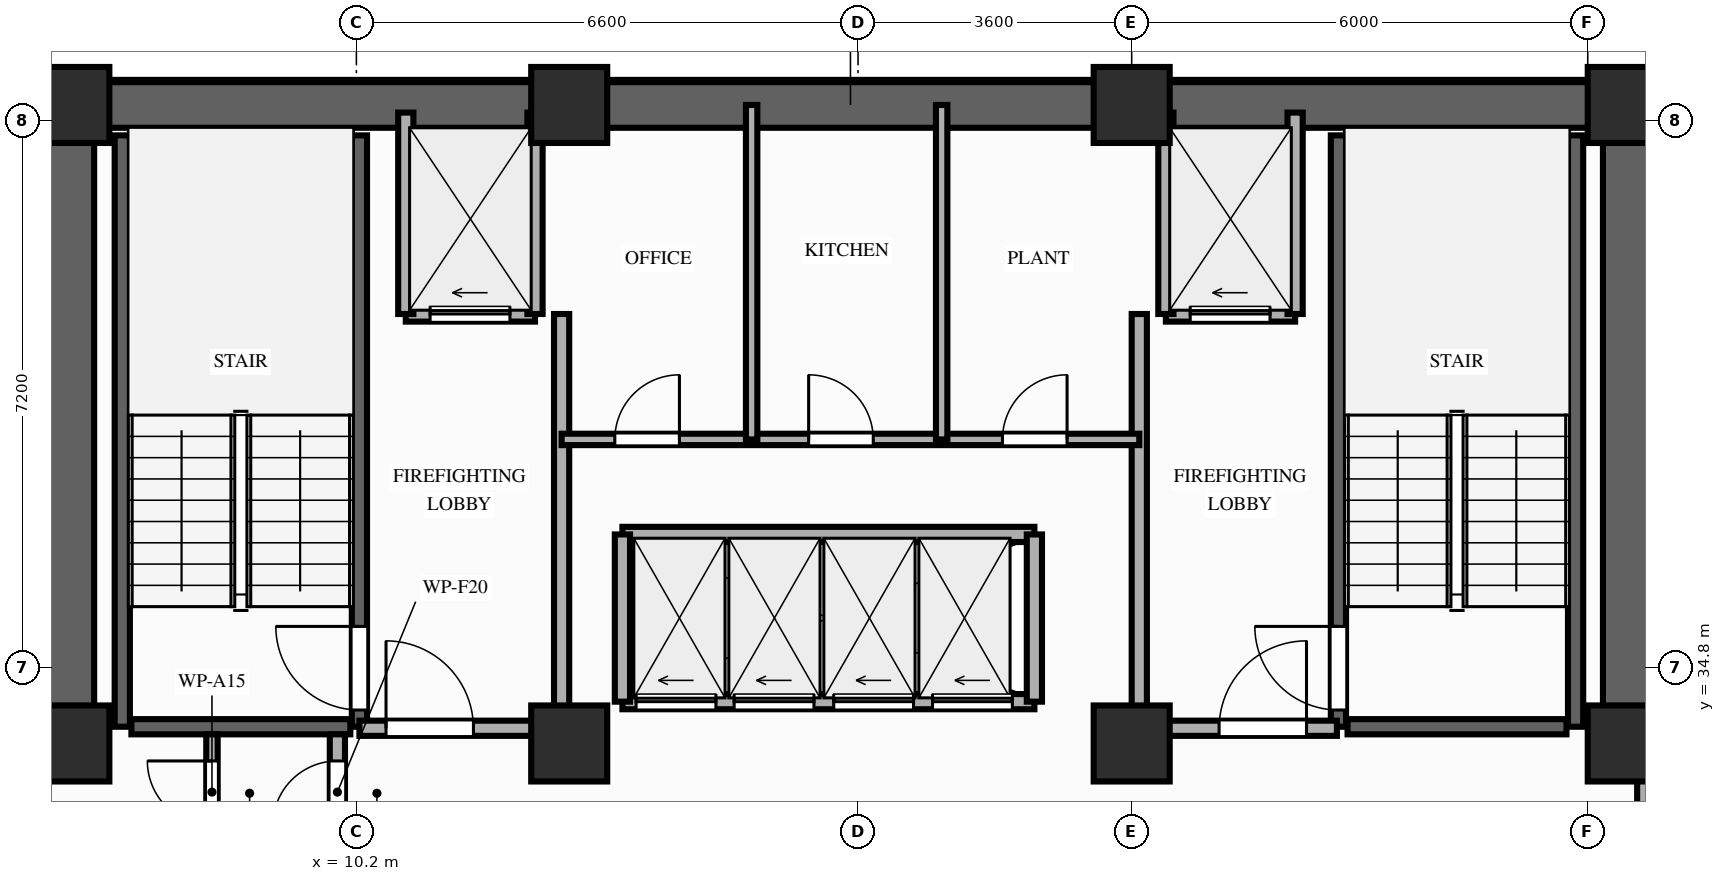
"""IFC4 building model, lengths in metres.
Left out: names, types, materials, properties, quantities, classifications, styles, units other than length and angle.
Written with IfcOpenShell. Run it as: python <this file> out.ifc"""

import sys

from ifc_helpers import new_model, si_unit, direction, frame, frame_2d, origin, origin_2d, place, context, subcontext, project, spatial, rectangle, extrude, element, fill, save


model = new_model("IFC4")
c1 = context("Model", 3, precision=1e-05, world=origin(), true_north=direction((0.0, 1.0)))
c2 = subcontext(c1, "Body", "Model", "MODEL_VIEW")
j1 = project(units=[si_unit("LENGTHUNIT", "METRE"), si_unit("PLANEANGLEUNIT", "RADIAN")], contexts=[c1])
p1 = place(None, origin())
s1 = spatial("IfcSite", under=j1, at=p1, CompositionType="ELEMENT")
p2 = place(p1, origin())
s2 = spatial("IfcBuilding", under=s1, at=p2, CompositionType="ELEMENT")
p3 = place(p2, frame((0.0, 0.0, 113.8)))
s3 = spatial("IfcBuildingStorey", under=s2, at=p3, CompositionType="ELEMENT", Elevation=113.8)
for number, where, z_axis, x_axis in (
    (1, (6.45, 33.8, 0.0), (0.0, 0.0, 1.0), (1.0, 0.0, 0.0)),
    (2, (13.0, 33.8, 0.0), (0.0, 0.0, 1.0), (1.0, 0.0, 0.0)),
    (3, (20.4, 33.8, 0.0), (0.0, 0.0, 1.0), (1.0, 0.0, 0.0)),
    (4, (26.9, 33.8, 0.0), (0.0, 0.0, 1.0), (1.0, 0.0, 0.0)),
    (5, (6.45, 42.2, 0.0), (0.0, 0.0, 1.0), (1.0, 0.0, 0.0)),
    (6, (13.0, 42.2, 0.0), (0.0, 0.0, 1.0), (1.0, 0.0, 0.0)),
    (7, (20.4, 42.2, 0.0), (0.0, 0.0, 1.0), (1.0, 0.0, 0.0)),
    (8, (26.9, 42.2, 0.0), (0.0, 0.0, 1.0), (1.0, 0.0, 0.0)),
):
    element("IfcColumn", number, at=place(p3, frame(where, z_axis=z_axis, x_axis=x_axis)), inside=s3, PredefinedType="COLUMN", context=c2, shape_type="SweptSolid", body=[
        extrude(rectangle(XDim=1.0, YDim=1.0, at=origin_2d()), origin(), (0.0, 0.0, 1.0), 3.2),
    ])
p4 = place(p3, frame((6.45, 42.2, 0.0), z_axis=(0.0, 0.0, 1.0), x_axis=(1.0, 0.0, 0.0)))
e9 = element("IfcWall", 9, at=p4, inside=s3, PredefinedType="SHEAR", context=c2, shape_type="SweptSolid", body=[
    extrude(rectangle(XDim=20.45, YDim=0.6, at=frame_2d((10.225, 0.0))), origin(), (0.0, 0.0, 1.0), 3.02),
])
for number, where, z_axis, x_axis in (
    (10, (6.45, 33.8, 0.0), (0.0, 0.0, 1.0), (0.0, 1.0, 0.0)),
    (11, (26.9, 33.8, 0.0), (0.0, 0.0, 1.0), (0.0, 1.0, 0.0)),
):
    element("IfcWall", number, at=place(p3, frame(where, z_axis=z_axis, x_axis=x_axis)), inside=s3, PredefinedType="SHEAR", context=c2, shape_type="SweptSolid", body=[
        extrude(rectangle(XDim=7.95, YDim=0.6, at=frame_2d((3.975, 0.0))), origin(), (0.0, 0.0, 1.0), 3.02),
    ])
p5 = place(p3, frame((7.12, 34.02, 0.0), z_axis=(0.0, 0.0, 1.0), x_axis=(0.0, 1.0, 0.0)))
e12 = element("IfcWall", 12, at=p5, inside=s3, PredefinedType="SHEAR", context=c2, shape_type="SweptSolid", body=[
    extrude(rectangle(XDim=7.78, YDim=0.2, at=frame_2d((3.89, 0.0))), origin(), (0.0, 0.0, 1.0), 3.02),
])
p6 = place(p3, frame((10.24, 34.02, 0.0), z_axis=(0.0, 0.0, 1.0), x_axis=(0.0, 1.0, 0.0)))
e13 = element("IfcWall", 13, at=p6, inside=s3, PredefinedType="SHEAR", context=c2, shape_type="SweptSolid", body=[
    extrude(rectangle(XDim=7.78, YDim=0.2, at=frame_2d((3.89, 0.0))), origin(), (0.0, 0.0, 1.0), 3.02),
])
p7 = place(p6, frame((0.22, 0.0, 0.0)))
e14 = element("IfcOpeningElement", 14, at=p7, cuts=e13, PredefinedType="OPENING", context=c2, shape_type="SweptSolid", body=[
    extrude(rectangle(XDim=1.1, YDim=2.15, at=frame_2d((0.55, 1.075))), frame((0.0, 0.11, 0.0), z_axis=(0.0, -1.0, 0.0), x_axis=(1.0, 0.0, 0.0)), (0.0, 0.0, 1.0), 0.22),
])
p8 = place(p3, frame((7.24, 34.02, 0.0), z_axis=(0.0, 0.0, 1.0), x_axis=(1.0, 0.0, 0.0)))
e15 = element("IfcWall", 15, at=p8, inside=s3, PredefinedType="SHEAR", context=c2, shape_type="SweptSolid", body=[
    extrude(rectangle(XDim=2.88, YDim=0.2, at=frame_2d((1.44, 0.0))), origin(), (0.0, 0.0, 1.0), 3.02),
])
p9 = place(p3, frame((23.12, 34.02, 0.0), z_axis=(0.0, 0.0, 1.0), x_axis=(0.0, 1.0, 0.0)))
e16 = element("IfcWall", 16, at=p9, inside=s3, PredefinedType="SHEAR", context=c2, shape_type="SweptSolid", body=[
    extrude(rectangle(XDim=7.78, YDim=0.2, at=frame_2d((3.89, 0.0))), origin(), (0.0, 0.0, 1.0), 3.02),
])
p10 = place(p9, frame((0.22, 0.0, 0.0)))
e17 = element("IfcOpeningElement", 17, at=p10, cuts=e16, PredefinedType="OPENING", context=c2, shape_type="SweptSolid", body=[
    extrude(rectangle(XDim=1.1, YDim=2.15, at=frame_2d((0.55, 1.075))), frame((0.0, 0.11, 0.0), z_axis=(0.0, -1.0, 0.0), x_axis=(1.0, 0.0, 0.0)), (0.0, 0.0, 1.0), 0.22),
])
p11 = place(p3, frame((26.24, 34.02, 0.0), z_axis=(0.0, 0.0, 1.0), x_axis=(0.0, 1.0, 0.0)))
e18 = element("IfcWall", 18, at=p11, inside=s3, PredefinedType="SHEAR", context=c2, shape_type="SweptSolid", body=[
    extrude(rectangle(XDim=7.78, YDim=0.2, at=frame_2d((3.89, 0.0))), origin(), (0.0, 0.0, 1.0), 3.02),
])
p12 = place(p3, frame((23.24, 34.02, 0.0), z_axis=(0.0, 0.0, 1.0), x_axis=(1.0, 0.0, 0.0)))
e19 = element("IfcWall", 19, at=p12, inside=s3, PredefinedType="SHEAR", context=c2, shape_type="SweptSolid", body=[
    extrude(rectangle(XDim=2.88, YDim=0.2, at=frame_2d((1.44, 0.0))), origin(), (0.0, 0.0, 1.0), 3.02),
])
p13 = place(p3, frame((10.85, 39.45, 0.0), z_axis=(0.0, 0.0, 1.0), x_axis=(1.0, 0.0, 0.0)))
e20 = element("IfcWall", 20, at=p13, inside=s3, PredefinedType="MOVABLE", context=c2, shape_type="SweptSolid", body=[
    extrude(rectangle(XDim=1.7, YDim=0.2, at=frame_2d((0.85, 0.0))), origin(), (0.0, 0.0, 1.0), 3.02),
])
p14 = place(p13, frame((0.32, 0.0, 0.0)))
e21 = element("IfcOpeningElement", 21, at=p14, cuts=e20, PredefinedType="OPENING", context=c2, shape_type="SweptSolid", body=[
    extrude(rectangle(XDim=1.05, YDim=2.15, at=frame_2d((0.525, 1.075))), frame((0.0, 0.11, 0.0), z_axis=(0.0, -1.0, 0.0), x_axis=(1.0, 0.0, 0.0)), (0.0, 0.0, 1.0), 0.22),
])
p15 = place(p3, frame((20.85, 39.45, 0.0), z_axis=(0.0, 0.0, 1.0), x_axis=(1.0, 0.0, 0.0)))
e22 = element("IfcWall", 22, at=p15, inside=s3, PredefinedType="MOVABLE", context=c2, shape_type="SweptSolid", body=[
    extrude(rectangle(XDim=1.7, YDim=0.2, at=frame_2d((0.85, 0.0))), origin(), (0.0, 0.0, 1.0), 3.02),
])
p16 = place(p15, frame((0.32, 0.0, 0.0)))
e23 = element("IfcOpeningElement", 23, at=p16, cuts=e22, PredefinedType="OPENING", context=c2, shape_type="SweptSolid", body=[
    extrude(rectangle(XDim=1.05, YDim=2.15, at=frame_2d((0.525, 1.075))), frame((0.0, 0.11, 0.0), z_axis=(0.0, -1.0, 0.0), x_axis=(1.0, 0.0, 0.0)), (0.0, 0.0, 1.0), 0.22),
])
for number, where, z_axis, x_axis in (
    (24, (10.85, 39.45, 0.0), (0.0, 0.0, 1.0), (0.0, 1.0, 0.0)),
    (25, (12.55, 39.45, 0.0), (0.0, 0.0, 1.0), (0.0, 1.0, 0.0)),
):
    element("IfcWall", number, at=place(p3, frame(where, z_axis=z_axis, x_axis=x_axis)), inside=s3, PredefinedType="MOVABLE", context=c2, shape_type="SweptSolid", body=[
        extrude(rectangle(XDim=2.65, YDim=0.2, at=frame_2d((1.325, 0.0))), origin(), (0.0, 0.0, 1.0), 2.4),
    ])
p17 = place(p3, frame((12.9, 34.0, 0.0), z_axis=(0.0, 0.0, 1.0), x_axis=(0.0, 1.0, 0.0)))
e26 = element("IfcWall", 26, at=p17, inside=s3, PredefinedType="PARTITIONING", context=c2, shape_type="SweptSolid", body=[
    extrude(rectangle(XDim=5.45, YDim=0.2, at=frame_2d((2.725, 0.0))), origin(), (0.0, 0.0, 1.0), 2.4),
])
p18 = place(p3, frame((10.24, 34.0, 0.0), z_axis=(0.0, 0.0, 1.0), x_axis=(1.0, 0.0, 0.0)))
e27 = element("IfcWall", 27, at=p18, inside=s3, PredefinedType="PARTITIONING", context=c2, shape_type="SweptSolid", body=[
    extrude(rectangle(XDim=2.66, YDim=0.2, at=frame_2d((1.33, 0.0))), origin(), (0.0, 0.0, 1.0), 2.4),
])
p19 = place(p18, frame((0.35, 0.0, 0.0)))
e28 = element("IfcOpeningElement", 28, at=p19, cuts=e27, PredefinedType="OPENING", context=c2, shape_type="SweptSolid", body=[
    extrude(rectangle(XDim=1.15, YDim=2.15, at=frame_2d((0.575, 1.075))), frame((0.0, 0.11, 0.0), z_axis=(0.0, -1.0, 0.0), x_axis=(1.0, 0.0, 0.0)), (0.0, 0.0, 1.0), 0.22),
])
for number, where, z_axis, x_axis in (
    (29, (20.85, 39.45, 0.0), (0.0, 0.0, 1.0), (0.0, 1.0, 0.0)),
    (30, (22.55, 39.45, 0.0), (0.0, 0.0, 1.0), (0.0, 1.0, 0.0)),
):
    element("IfcWall", number, at=place(p3, frame(where, z_axis=z_axis, x_axis=x_axis)), inside=s3, PredefinedType="MOVABLE", context=c2, shape_type="SweptSolid", body=[
        extrude(rectangle(XDim=2.65, YDim=0.2, at=frame_2d((1.325, 0.0))), origin(), (0.0, 0.0, 1.0), 2.4),
    ])
p20 = place(p3, frame((20.5, 34.0, 0.0), z_axis=(0.0, 0.0, 1.0), x_axis=(0.0, 1.0, 0.0)))
e31 = element("IfcWall", 31, at=p20, inside=s3, PredefinedType="PARTITIONING", context=c2, shape_type="SweptSolid", body=[
    extrude(rectangle(XDim=5.45, YDim=0.2, at=frame_2d((2.725, 0.0))), origin(), (0.0, 0.0, 1.0), 2.4),
])
p21 = place(p3, frame((20.5, 34.0, 0.0), z_axis=(0.0, 0.0, 1.0), x_axis=(1.0, 0.0, 0.0)))
e32 = element("IfcWall", 32, at=p21, inside=s3, PredefinedType="PARTITIONING", context=c2, shape_type="SweptSolid", body=[
    extrude(rectangle(XDim=2.6, YDim=0.2, at=frame_2d((1.3, 0.0))), origin(), (0.0, 0.0, 1.0), 2.4),
])
p22 = place(p21, frame((1.05, 0.0, 0.0)))
e33 = element("IfcOpeningElement", 33, at=p22, cuts=e32, PredefinedType="OPENING", context=c2, shape_type="SweptSolid", body=[
    extrude(rectangle(XDim=1.15, YDim=2.15, at=frame_2d((0.575, 1.075))), frame((0.0, 0.11, 0.0), z_axis=(0.0, -1.0, 0.0), x_axis=(1.0, 0.0, 0.0)), (0.0, 0.0, 1.0), 0.22),
])
p23 = place(p3, frame((9.95, 32.4, 0.0), z_axis=(0.0, 0.0, 1.0), x_axis=(0.0, 1.0, 0.0)))
e34 = element("IfcWall", 34, at=p23, inside=s3, PredefinedType="PARTITIONING", context=c2, shape_type="SweptSolid", body=[
    extrude(rectangle(XDim=1.52, YDim=0.2, at=frame_2d((0.76, 0.0))), origin(), (0.0, 0.0, 1.0), 2.4),
])
p24 = place(p23, frame((0.32, 0.0, 0.0)))
e35 = element("IfcOpeningElement", 35, at=p24, cuts=e34, PredefinedType="OPENING", context=c2, shape_type="SweptSolid", body=[
    extrude(rectangle(XDim=0.85, YDim=2.05, at=frame_2d((0.425, 1.025))), frame((0.0, 0.11, 0.0), z_axis=(0.0, -1.0, 0.0), x_axis=(1.0, 0.0, 0.0)), (0.0, 0.0, 1.0), 0.22),
])
p25 = place(p3, frame((8.3, 32.4, 0.0), z_axis=(0.0, 0.0, 1.0), x_axis=(0.0, 1.0, 0.0)))
e36 = element("IfcWall", 36, at=p25, inside=s3, PredefinedType="PARTITIONING", context=c2, shape_type="SweptSolid", body=[
    extrude(rectangle(XDim=1.52, YDim=0.15, at=frame_2d((0.76, 0.0))), origin(), (0.0, 0.0, 1.0), 2.4),
])
p26 = place(p25, frame((0.32, 0.0, 0.0)))
e37 = element("IfcOpeningElement", 37, at=p26, cuts=e36, PredefinedType="OPENING", context=c2, shape_type="SweptSolid", body=[
    extrude(rectangle(XDim=0.85, YDim=2.05, at=frame_2d((0.425, 1.025))), frame((0.0, 0.085, 0.0), z_axis=(0.0, -1.0, 0.0), x_axis=(1.0, 0.0, 0.0)), (0.0, 0.0, 1.0), 0.17),
])
p27 = place(p3, frame((12.9, 37.8, 0.0), z_axis=(0.0, 0.0, 1.0), x_axis=(1.0, 0.0, 0.0)))
e38 = element("IfcWall", 38, at=p27, inside=s3, PredefinedType="PARTITIONING", context=c2, shape_type="SweptSolid", body=[
    extrude(rectangle(XDim=7.6, YDim=0.15, at=frame_2d((3.8, 0.0))), origin(), (0.0, 0.0, 1.0), 3.02),
])
p28 = place(p27, frame((0.7, 0.0, 0.0)))
e39 = element("IfcOpeningElement", 39, at=p28, cuts=e38, PredefinedType="OPENING", context=c2, shape_type="SweptSolid", body=[
    extrude(rectangle(XDim=0.85, YDim=2.05, at=frame_2d((0.425, 1.025))), frame((0.0, 0.085, 0.0), z_axis=(0.0, -1.0, 0.0), x_axis=(1.0, 0.0, 0.0)), (0.0, 0.0, 1.0), 0.17),
])
p29 = place(p27, frame((3.25, 0.0, 0.0)))
e40 = element("IfcOpeningElement", 40, at=p29, cuts=e38, PredefinedType="OPENING", context=c2, shape_type="SweptSolid", body=[
    extrude(rectangle(XDim=0.85, YDim=2.05, at=frame_2d((0.425, 1.025))), frame((0.0, 0.085, 0.0), z_axis=(0.0, -1.0, 0.0), x_axis=(1.0, 0.0, 0.0)), (0.0, 0.0, 1.0), 0.17),
])
p30 = place(p27, frame((5.8, 0.0, 0.0)))
e41 = element("IfcOpeningElement", 41, at=p30, cuts=e38, PredefinedType="OPENING", context=c2, shape_type="SweptSolid", body=[
    extrude(rectangle(XDim=0.85, YDim=2.05, at=frame_2d((0.425, 1.025))), frame((0.0, 0.085, 0.0), z_axis=(0.0, -1.0, 0.0), x_axis=(1.0, 0.0, 0.0)), (0.0, 0.0, 1.0), 0.17),
])
for number, where, z_axis, x_axis in (
    (42, (15.4, 37.8, 0.0), (0.0, 0.0, 1.0), (0.0, 1.0, 0.0)),
    (43, (17.9, 37.8, 0.0), (0.0, 0.0, 1.0), (0.0, 1.0, 0.0)),
):
    element("IfcWall", number, at=place(p3, frame(where, z_axis=z_axis, x_axis=x_axis)), inside=s3, PredefinedType="PARTITIONING", context=c2, shape_type="SweptSolid", body=[
        extrude(rectangle(XDim=4.4, YDim=0.15, at=frame_2d((2.2, 0.0))), origin(), (0.0, 0.0, 1.0), 2.4),
    ])
p31 = place(p3, frame((13.7, 34.35, 0.0), z_axis=(0.0, 0.0, 1.0), x_axis=(1.0, 0.0, 0.0)))
e44 = element("IfcWall", 44, at=p31, inside=s3, PredefinedType="MOVABLE", context=c2, shape_type="SweptSolid", body=[
    extrude(rectangle(XDim=5.42, YDim=0.2, at=frame_2d((2.71, 0.0))), origin(), (0.0, 0.0, 1.0), 3.02),
])
p32 = place(p31, frame((0.18, 0.0, 0.0)))
e45 = element("IfcOpeningElement", 45, at=p32, cuts=e44, PredefinedType="OPENING", context=c2, shape_type="SweptSolid", body=[
    extrude(rectangle(XDim=1.05, YDim=2.15, at=frame_2d((0.525, 1.075))), frame((0.0, 0.11, 0.0), z_axis=(0.0, -1.0, 0.0), x_axis=(1.0, 0.0, 0.0)), (0.0, 0.0, 1.0), 0.22),
])
p33 = place(p31, frame((1.47, 0.0, 0.0)))
e46 = element("IfcOpeningElement", 46, at=p33, cuts=e44, PredefinedType="OPENING", context=c2, shape_type="SweptSolid", body=[
    extrude(rectangle(XDim=1.05, YDim=2.15, at=frame_2d((0.525, 1.075))), frame((0.0, 0.11, 0.0), z_axis=(0.0, -1.0, 0.0), x_axis=(1.0, 0.0, 0.0)), (0.0, 0.0, 1.0), 0.22),
])
p34 = place(p31, frame((2.78, 0.0, 0.0)))
e47 = element("IfcOpeningElement", 47, at=p34, cuts=e44, PredefinedType="OPENING", context=c2, shape_type="SweptSolid", body=[
    extrude(rectangle(XDim=1.05, YDim=2.15, at=frame_2d((0.525, 1.075))), frame((0.0, 0.11, 0.0), z_axis=(0.0, -1.0, 0.0), x_axis=(1.0, 0.0, 0.0)), (0.0, 0.0, 1.0), 0.22),
])
p35 = place(p31, frame((4.08, 0.0, 0.0)))
e48 = element("IfcOpeningElement", 48, at=p35, cuts=e44, PredefinedType="OPENING", context=c2, shape_type="SweptSolid", body=[
    extrude(rectangle(XDim=1.05, YDim=2.15, at=frame_2d((0.525, 1.075))), frame((0.0, 0.11, 0.0), z_axis=(0.0, -1.0, 0.0), x_axis=(1.0, 0.0, 0.0)), (0.0, 0.0, 1.0), 0.22),
])
p36 = place(p3, frame((13.7, 36.55, 0.0), z_axis=(0.0, 0.0, 1.0), x_axis=(1.0, 0.0, 0.0)))
e49 = element("IfcWall", 49, at=p36, inside=s3, PredefinedType="MOVABLE", context=c2, shape_type="SweptSolid", body=[
    extrude(rectangle(XDim=5.42, YDim=0.2, at=frame_2d((2.71, 0.0))), origin(), (0.0, 0.0, 1.0), 3.02),
])
for number, where, z_axis, x_axis in (
    (50, (13.7, 34.35, 0.0), (0.0, 0.0, 1.0), (0.0, 1.0, 0.0)),
    (51, (19.12, 34.35, 0.0), (0.0, 0.0, 1.0), (0.0, 1.0, 0.0)),
):
    element("IfcWall", number, at=place(p3, frame(where, z_axis=z_axis, x_axis=x_axis)), inside=s3, PredefinedType="MOVABLE", context=c2, shape_type="SweptSolid", body=[
        extrude(rectangle(XDim=2.2, YDim=0.2, at=frame_2d((1.1, 0.0))), origin(), (0.0, 0.0, 1.0), 3.02),
    ])
p37 = place(p3, frame((27.15, 32.6, 0.0), z_axis=(0.0, 0.0, 1.0), x_axis=(0.0, 1.0, 0.0)))
e52 = element("IfcWall", 52, at=p37, inside=s3, PredefinedType="PARTITIONING", context=c2, shape_type="SweptSolid", body=[
    extrude(rectangle(XDim=1.08, YDim=0.2, at=frame_2d((0.54, 0.0))), origin(), (0.0, 0.0, 1.0), 2.4),
])
p38 = place(p7, origin())
e53 = element("IfcDoor", 53, at=p38, inside=s3, OperationType="SINGLE_SWING_RIGHT", PredefinedType="DOOR", context=c2, shape_type="SweptSolid", body=[
    extrude(rectangle(XDim=1.1, YDim=2.15, at=frame_2d((0.55, 1.075))), frame((0.0, 0.025, 0.0), z_axis=(0.0, -1.0, 0.0), x_axis=(1.0, 0.0, 0.0)), (0.0, 0.0, 1.0), 0.05),
])
fill(e14, e53)
p39 = place(p10, origin())
e54 = element("IfcDoor", 54, at=p39, inside=s3, OperationType="SINGLE_SWING_RIGHT", PredefinedType="DOOR", context=c2, shape_type="SweptSolid", body=[
    extrude(rectangle(XDim=1.1, YDim=2.15, at=frame_2d((0.55, 1.075))), frame((0.0, 0.025, 0.0), z_axis=(0.0, -1.0, 0.0), x_axis=(1.0, 0.0, 0.0)), (0.0, 0.0, 1.0), 0.05),
])
fill(e17, e54)
p40 = place(p14, origin())
e55 = element("IfcDoor", 55, at=p40, inside=s3, OperationType="SLIDING_TO_LEFT", PredefinedType="DOOR", context=c2, shape_type="SweptSolid", body=[
    extrude(rectangle(XDim=1.05, YDim=2.15, at=frame_2d((0.525, 1.075))), frame((0.0, 0.025, 0.0), z_axis=(0.0, -1.0, 0.0), x_axis=(1.0, 0.0, 0.0)), (0.0, 0.0, 1.0), 0.05),
])
fill(e21, e55)
p41 = place(p16, origin())
e56 = element("IfcDoor", 56, at=p41, inside=s3, OperationType="SLIDING_TO_LEFT", PredefinedType="DOOR", context=c2, shape_type="SweptSolid", body=[
    extrude(rectangle(XDim=1.05, YDim=2.15, at=frame_2d((0.525, 1.075))), frame((0.0, 0.025, 0.0), z_axis=(0.0, -1.0, 0.0), x_axis=(1.0, 0.0, 0.0)), (0.0, 0.0, 1.0), 0.05),
])
fill(e23, e56)
p42 = place(p19, origin())
e57 = element("IfcDoor", 57, at=p42, inside=s3, OperationType="SINGLE_SWING_LEFT", PredefinedType="DOOR", context=c2, shape_type="SweptSolid", body=[
    extrude(rectangle(XDim=1.15, YDim=2.15, at=frame_2d((0.575, 1.075))), frame((0.0, 0.025, 0.0), z_axis=(0.0, -1.0, 0.0), x_axis=(1.0, 0.0, 0.0)), (0.0, 0.0, 1.0), 0.05),
])
fill(e28, e57)
p43 = place(p22, origin())
e58 = element("IfcDoor", 58, at=p43, inside=s3, OperationType="SINGLE_SWING_RIGHT", PredefinedType="DOOR", context=c2, shape_type="SweptSolid", body=[
    extrude(rectangle(XDim=1.15, YDim=2.15, at=frame_2d((0.575, 1.075))), frame((0.0, 0.025, 0.0), z_axis=(0.0, -1.0, 0.0), x_axis=(1.0, 0.0, 0.0)), (0.0, 0.0, 1.0), 0.05),
])
fill(e33, e58)
p44 = place(p24, origin())
e59 = element("IfcDoor", 59, at=p44, inside=s3, OperationType="SINGLE_SWING_LEFT", PredefinedType="DOOR", context=c2, shape_type="SweptSolid", body=[
    extrude(rectangle(XDim=0.85, YDim=2.05, at=frame_2d((0.425, 1.025))), frame((0.0, 0.025, 0.0), z_axis=(0.0, -1.0, 0.0), x_axis=(1.0, 0.0, 0.0)), (0.0, 0.0, 1.0), 0.05),
])
fill(e35, e59)
p45 = place(p26, origin())
e60 = element("IfcDoor", 60, at=p45, inside=s3, OperationType="SINGLE_SWING_RIGHT", PredefinedType="DOOR", context=c2, shape_type="SweptSolid", body=[
    extrude(rectangle(XDim=0.85, YDim=2.05, at=frame_2d((0.425, 1.025))), frame((0.0, 0.025, 0.0), z_axis=(0.0, -1.0, 0.0), x_axis=(1.0, 0.0, 0.0)), (0.0, 0.0, 1.0), 0.05),
])
fill(e37, e60)
p46 = place(p28, origin())
e61 = element("IfcDoor", 61, at=p46, inside=s3, OperationType="SINGLE_SWING_RIGHT", PredefinedType="DOOR", context=c2, shape_type="SweptSolid", body=[
    extrude(rectangle(XDim=0.85, YDim=2.05, at=frame_2d((0.425, 1.025))), frame((0.0, 0.025, 0.0), z_axis=(0.0, -1.0, 0.0), x_axis=(1.0, 0.0, 0.0)), (0.0, 0.0, 1.0), 0.05),
])
fill(e39, e61)
p47 = place(p29, origin())
e62 = element("IfcDoor", 62, at=p47, inside=s3, OperationType="SINGLE_SWING_LEFT", PredefinedType="DOOR", context=c2, shape_type="SweptSolid", body=[
    extrude(rectangle(XDim=0.85, YDim=2.05, at=frame_2d((0.425, 1.025))), frame((0.0, 0.025, 0.0), z_axis=(0.0, -1.0, 0.0), x_axis=(1.0, 0.0, 0.0)), (0.0, 0.0, 1.0), 0.05),
])
fill(e40, e62)
p48 = place(p30, origin())
e63 = element("IfcDoor", 63, at=p48, inside=s3, OperationType="SINGLE_SWING_RIGHT", PredefinedType="DOOR", context=c2, shape_type="SweptSolid", body=[
    extrude(rectangle(XDim=0.85, YDim=2.05, at=frame_2d((0.425, 1.025))), frame((0.0, 0.025, 0.0), z_axis=(0.0, -1.0, 0.0), x_axis=(1.0, 0.0, 0.0)), (0.0, 0.0, 1.0), 0.05),
])
fill(e41, e63)
p49 = place(p32, origin())
e64 = element("IfcDoor", 64, at=p49, inside=s3, OperationType="SLIDING_TO_LEFT", PredefinedType="DOOR", context=c2, shape_type="SweptSolid", body=[
    extrude(rectangle(XDim=1.05, YDim=2.15, at=frame_2d((0.525, 1.075))), frame((0.0, 0.025, 0.0), z_axis=(0.0, -1.0, 0.0), x_axis=(1.0, 0.0, 0.0)), (0.0, 0.0, 1.0), 0.05),
])
fill(e45, e64)
p50 = place(p33, origin())
e65 = element("IfcDoor", 65, at=p50, inside=s3, OperationType="SLIDING_TO_LEFT", PredefinedType="DOOR", context=c2, shape_type="SweptSolid", body=[
    extrude(rectangle(XDim=1.05, YDim=2.15, at=frame_2d((0.525, 1.075))), frame((0.0, 0.025, 0.0), z_axis=(0.0, -1.0, 0.0), x_axis=(1.0, 0.0, 0.0)), (0.0, 0.0, 1.0), 0.05),
])
fill(e46, e65)
p51 = place(p34, origin())
e66 = element("IfcDoor", 66, at=p51, inside=s3, OperationType="SLIDING_TO_LEFT", PredefinedType="DOOR", context=c2, shape_type="SweptSolid", body=[
    extrude(rectangle(XDim=1.05, YDim=2.15, at=frame_2d((0.525, 1.075))), frame((0.0, 0.025, 0.0), z_axis=(0.0, -1.0, 0.0), x_axis=(1.0, 0.0, 0.0)), (0.0, 0.0, 1.0), 0.05),
])
fill(e47, e66)
p52 = place(p35, origin())
e67 = element("IfcDoor", 67, at=p52, inside=s3, OperationType="SLIDING_TO_LEFT", PredefinedType="DOOR", context=c2, shape_type="SweptSolid", body=[
    extrude(rectangle(XDim=1.05, YDim=2.15, at=frame_2d((0.525, 1.075))), frame((0.0, 0.025, 0.0), z_axis=(0.0, -1.0, 0.0), x_axis=(1.0, 0.0, 0.0)), (0.0, 0.0, 1.0), 0.05),
])
fill(e48, e67)
save(model, sys.argv[1])
